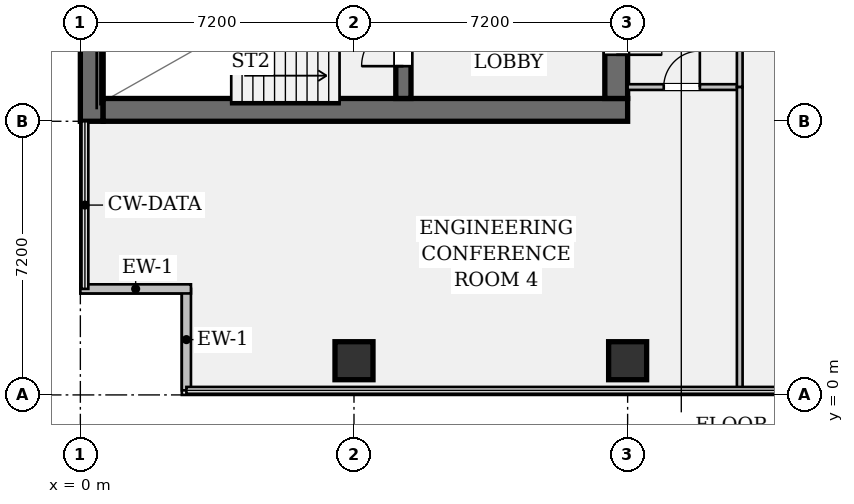
"""IFC4 building model, lengths in metres.
Left out: names, types, materials, properties, quantities, classifications, styles, units other than length and angle.
Written with IfcOpenShell. Run it as: python <this file> out.ifc"""

import sys

from ifc_helpers import new_model, si_unit, direction, frame, frame_2d, origin, origin_2d, place, context, subcontext, project, spatial, rectangle, hollow_rectangle, extrude, element, fill, save


model = new_model("IFC4")
c1 = context("Model", 3, precision=1e-05, world=origin(), true_north=direction((0.0, 1.0)))
c2 = subcontext(c1, "Body", "Model", "MODEL_VIEW")
j1 = project(units=[si_unit("LENGTHUNIT", "METRE"), si_unit("PLANEANGLEUNIT", "RADIAN")], contexts=[c1])
p1 = place(None, origin())
s1 = spatial("IfcSite", under=j1, at=p1, CompositionType="ELEMENT")
p2 = place(p1, origin())
s2 = spatial("IfcBuilding", under=s1, at=p2, CompositionType="ELEMENT")
p3 = place(p2, frame((0.0, 0.0, 54.25)))
s3 = spatial("IfcBuildingStorey", under=s2, at=p3, CompositionType="ELEMENT", Elevation=54.25)
p4 = place(p3, frame((0.3, 7.2, 0.0), z_axis=(0.0, 0.0, 1.0), x_axis=(0.0, 1.0, 0.0)))
e1 = element("IfcWall", 1, at=p4, inside=s3, PredefinedType="SHEAR", context=c2, shape_type="SweptSolid", body=[
    extrude(rectangle(XDim=28.8, YDim=0.6, at=frame_2d((14.4, 0.0))), origin(), (0.0, 0.0, 1.0), 3.57),
])
p5 = place(p3, frame((0.6, 7.5, 0.0), z_axis=(0.0, 0.0, 1.0), x_axis=(1.0, 0.0, 0.0)))
e2 = element("IfcWall", 2, at=p5, inside=s3, PredefinedType="SHEAR", context=c2, shape_type="SweptSolid", body=[
    extrude(rectangle(XDim=13.8, YDim=0.6, at=frame_2d((6.9, 0.0))), origin(), (0.0, 0.0, 1.0), 3.57),
])
p6 = place(p3, frame((14.1, 35.4, 0.0), z_axis=(0.0, 0.0, 1.0), x_axis=(0.0, -1.0, 0.0)))
e3 = element("IfcWall", 3, at=p6, inside=s3, PredefinedType="SHEAR", context=c2, shape_type="SweptSolid", body=[
    extrude(rectangle(XDim=27.6, YDim=0.6, at=frame_2d((13.8, 0.0))), origin(), (0.0, 0.0, 1.0), 3.57),
])
p7 = place(p6, frame((1.3, 0.0, 0.0)))
e4 = element("IfcOpeningElement", 4, at=p7, cuts=e3, PredefinedType="OPENING", context=c2, shape_type="SweptSolid", body=[
    extrude(rectangle(XDim=1.2, YDim=2.15, at=frame_2d((0.6, 1.075))), frame((0.0, 0.312, 0.0), z_axis=(0.0, -1.0, 0.0), x_axis=(1.0, 0.0, 0.0)), (0.0, 0.0, 1.0), 0.624),
])
p8 = place(p6, frame((25.25, 0.0, 0.0)))
e5 = element("IfcOpeningElement", 5, at=p8, cuts=e3, PredefinedType="OPENING", context=c2, shape_type="SweptSolid", body=[
    extrude(rectangle(XDim=1.2, YDim=2.15, at=frame_2d((0.6, 1.075))), frame((0.0, 0.312, 0.0), z_axis=(0.0, -1.0, 0.0), x_axis=(1.0, 0.0, 0.0)), (0.0, 0.0, 1.0), 0.624),
])
p9 = place(p6, frame((14.6, 0.0, 0.0)))
e6 = element("IfcOpeningElement", 6, at=p9, cuts=e3, PredefinedType="OPENING", context=c2, shape_type="SweptSolid", body=[
    extrude(rectangle(XDim=1.6, YDim=2.2, at=frame_2d((0.8, 1.1))), frame((0.0, 0.312, 0.0), z_axis=(0.0, -1.0, 0.0), x_axis=(1.0, 0.0, 0.0)), (0.0, 0.0, 1.0), 0.624),
])
p10 = place(p3, frame((8.5, 7.8, 0.0), z_axis=(0.0, 0.0, 1.0), x_axis=(0.0, 1.0, 0.0)))
e7 = element("IfcWall", 7, at=p10, inside=s3, PredefinedType="SHEAR", context=c2, shape_type="SweptSolid", body=[
    extrude(rectangle(XDim=3.68, YDim=0.4, at=frame_2d((1.84, 0.0))), origin(), (0.0, 0.0, 1.0), 3.57),
])
p11 = place(p10, frame((0.85, 0.0, 0.0)))
e8 = element("IfcOpeningElement", 8, at=p11, cuts=e7, PredefinedType="OPENING", context=c2, shape_type="SweptSolid", body=[
    extrude(rectangle(XDim=1.1, YDim=2.15, at=frame_2d((0.55, 1.075))), frame((0.0, 0.212, 0.0), z_axis=(0.0, -1.0, 0.0), x_axis=(1.0, 0.0, 0.0)), (0.0, 0.0, 1.0), 0.424),
])
for number, where, z_axis, x_axis in (
    (9, (7.2, 0.9, 0.0), (0.0, 0.0, 1.0), (1.0, 0.0, 0.0)),
    (10, (14.4, 0.9, 0.0), (0.0, 0.0, 1.0), (1.0, 0.0, 0.0)),
):
    element("IfcColumn", number, at=place(p3, frame(where, z_axis=z_axis, x_axis=x_axis)), inside=s3, PredefinedType="COLUMN", context=c2, shape_type="SweptSolid", body=[
        extrude(hollow_rectangle(XDim=1.0, YDim=1.0, WallThickness=0.065, at=origin_2d()), origin(), (0.0, 0.0, 1.0), 3.57),
    ])
p12 = place(p3, frame((2.79, 0.12, 0.0), z_axis=(0.0, 0.0, 1.0), x_axis=(0.0, 1.0, 0.0)))
e11 = element("IfcWall", 11, at=p12, inside=s3, PredefinedType="STANDARD", context=c2, shape_type="SweptSolid", body=[
    extrude(rectangle(XDim=2.67, YDim=0.24, at=frame_2d((1.335, 0.0))), origin(), (0.0, 0.0, 1.0), 3.57),
])
p13 = place(p3, frame((2.91, 2.79, 0.0), z_axis=(0.0, 0.0, 1.0), x_axis=(-1.0, 0.0, 0.0)))
e12 = element("IfcWall", 12, at=p13, inside=s3, PredefinedType="STANDARD", context=c2, shape_type="SweptSolid", body=[
    extrude(rectangle(XDim=2.91, YDim=0.24, at=frame_2d((1.455, 0.0))), origin(), (0.0, 0.0, 1.0), 3.57),
])
p14 = place(p3, frame((14.4, 8.1, 0.0), z_axis=(0.0, 0.0, 1.0), x_axis=(1.0, 0.0, 0.0)))
e13 = element("IfcWall", 13, at=p14, inside=s3, PredefinedType="PARTITIONING", context=c2, shape_type="SweptSolid", body=[
    extrude(rectangle(XDim=2.95, YDim=0.15, at=frame_2d((1.475, 0.0))), origin(), (0.0, 0.0, 1.0), 3.088),
])
p15 = place(p14, frame((0.95, 0.0, 0.0)))
e14 = element("IfcOpeningElement", 14, at=p15, cuts=e13, PredefinedType="OPENING", context=c2, shape_type="SweptSolid", body=[
    extrude(rectangle(XDim=0.95, YDim=2.15, at=frame_2d((0.475, 1.075))), frame((0.0, 0.087, 0.0), z_axis=(0.0, -1.0, 0.0), x_axis=(1.0, 0.0, 0.0)), (0.0, 0.0, 1.0), 0.174),
])
p16 = place(p3, frame((17.35, 8.1, 0.0), z_axis=(0.0, 0.0, 1.0), x_axis=(0.0, 1.0, 0.0)))
e15 = element("IfcWall", 15, at=p16, inside=s3, PredefinedType="PARTITIONING", context=c2, shape_type="SweptSolid", body=[
    extrude(rectangle(XDim=10.4, YDim=0.15, at=frame_2d((5.2, 0.0))), origin(), (0.0, 0.0, 1.0), 2.699),
])
p17 = place(p3, frame((17.35, 0.12, 0.0), z_axis=(0.0, 0.0, 1.0), x_axis=(0.0, 1.0, 0.0)))
e16 = element("IfcWall", 16, at=p17, inside=s3, PredefinedType="PARTITIONING", context=c2, shape_type="SweptSolid", body=[
    extrude(rectangle(XDim=7.98, YDim=0.15, at=frame_2d((3.99, 0.0))), origin(), (0.0, 0.0, 1.0), 2.699),
])
p18 = place(p11, origin())
e17 = element("IfcDoor", 17, at=p18, inside=s3, OperationType="SINGLE_SWING_LEFT", PredefinedType="DOOR", context=c2, shape_type="SweptSolid", body=[
    extrude(rectangle(XDim=1.1, YDim=2.15, at=frame_2d((0.55, 1.075))), frame((0.0, 0.025, 0.0), z_axis=(0.0, -1.0, 0.0), x_axis=(1.0, 0.0, 0.0)), (0.0, 0.0, 1.0), 0.05),
])
fill(e8, e17)
p19 = place(p8, origin())
e18 = element("IfcDoor", 18, at=p19, inside=s3, OperationType="SINGLE_SWING_RIGHT", PredefinedType="DOOR", context=c2, shape_type="SweptSolid", body=[
    extrude(rectangle(XDim=1.2, YDim=2.15, at=frame_2d((0.6, 1.075))), frame((0.0, 0.025, 0.0), z_axis=(0.0, -1.0, 0.0), x_axis=(1.0, 0.0, 0.0)), (0.0, 0.0, 1.0), 0.05),
])
fill(e5, e18)
p20 = place(p15, origin())
e19 = element("IfcDoor", 19, at=p20, inside=s3, OperationType="SINGLE_SWING_RIGHT", PredefinedType="DOOR", context=c2, shape_type="SweptSolid", body=[
    extrude(rectangle(XDim=0.95, YDim=2.15, at=frame_2d((0.475, 1.075))), frame((0.0, 0.025, 0.0), z_axis=(0.0, -1.0, 0.0), x_axis=(1.0, 0.0, 0.0)), (0.0, 0.0, 1.0), 0.05),
])
fill(e14, e19)
save(model, sys.argv[1])
